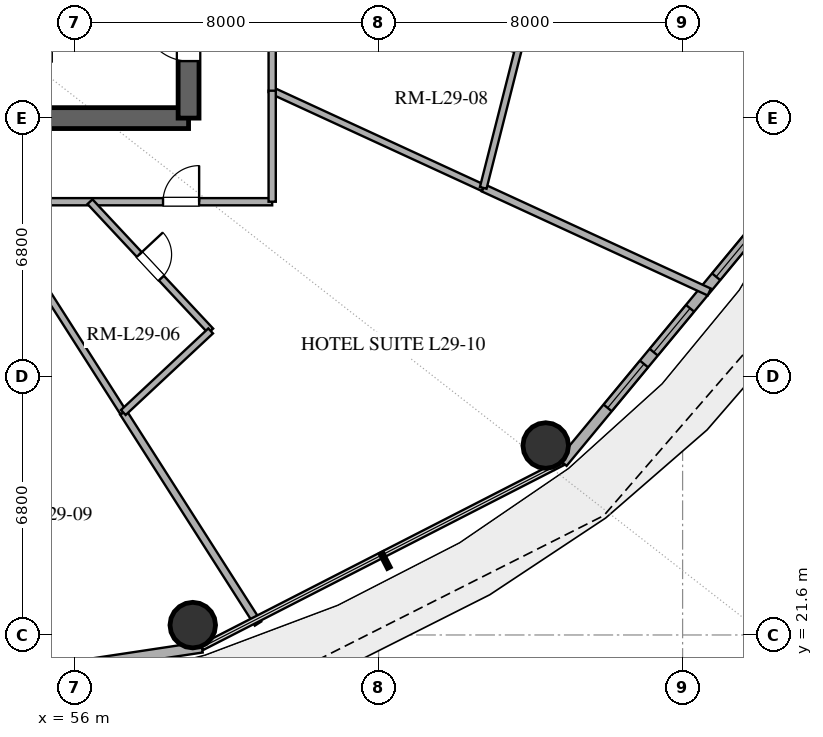
"""IFC4 building model, lengths in metres.
Left out: names, types, materials, properties, quantities, classifications, styles, units other than length and angle.
Written with IfcOpenShell. Run it as: python <this file> out.ifc"""

import sys

from ifc_helpers import new_model, si_unit, direction, frame, frame_2d, origin, origin_2d, place, context, subcontext, project, spatial, rectangle, hollow_circle, extrude, element, fill, save


model = new_model("IFC4")
c1 = context("Model", 3, precision=1e-05, world=origin(), true_north=direction((0.0, 1.0)))
c2 = subcontext(c1, "Body", "Model", "MODEL_VIEW")
j1 = project(units=[si_unit("LENGTHUNIT", "METRE"), si_unit("PLANEANGLEUNIT", "RADIAN")], contexts=[c1])
p1 = place(None, origin())
s1 = spatial("IfcSite", under=j1, at=p1, CompositionType="ELEMENT")
p2 = place(p1, origin())
s2 = spatial("IfcBuilding", under=s1, at=p2, CompositionType="ELEMENT")
p3 = place(p2, frame((0.0, 0.0, 116.4)))
s3 = spatial("IfcBuildingStorey", under=s2, at=p3, CompositionType="ELEMENT", Elevation=116.4)
p4 = place(p3, frame((55.0, 35.2, 0.0), z_axis=(0.0, 0.0, 1.0), x_axis=(1.0, 0.0, 0.0)))
e1 = element("IfcWall", 1, at=p4, inside=s3, PredefinedType="SHEAR", context=c2, shape_type="SweptSolid", body=[
    extrude(rectangle(XDim=4.0, YDim=0.55, at=frame_2d((2.0, 0.0))), origin(), (0.0, 0.0, 1.0), 3.38),
])
p5 = place(p3, frame((59.0, 35.2, 0.0), z_axis=(0.0, 0.0, 1.0), x_axis=(0.0, 1.0, 0.0)))
e2 = element("IfcWall", 2, at=p5, inside=s3, PredefinedType="SHEAR", context=c2, shape_type="SweptSolid", body=[
    extrude(rectangle(XDim=13.6, YDim=0.55, at=frame_2d((6.8, 0.0))), origin(), (0.0, 0.0, 1.0), 3.38),
])
p6 = place(p5, frame((1.5, 0.0, 0.0)))
e3 = element("IfcOpeningElement", 3, at=p6, cuts=e2, PredefinedType="OPENING", context=c2, shape_type="SweptSolid", body=[
    extrude(rectangle(XDim=1.2, YDim=2.15, at=frame_2d((0.6, 1.075))), frame((0.0, 0.285, 0.0), z_axis=(0.0, -1.0, 0.0), x_axis=(1.0, 0.0, 0.0)), (0.0, 0.0, 1.0), 0.57),
])
for number, where, z_axis, x_axis in (
    (4, (59.11, 21.859, 0.0), (0.0, 0.0, 1.0), (1.0, 0.0, 0.0)),
    (5, (68.398, 26.585, 0.0), (0.0, 0.0, 1.0), (1.0, 0.0, 0.0)),
):
    element("IfcColumn", number, at=place(p3, frame(where, z_axis=z_axis, x_axis=x_axis)), inside=s3, PredefinedType="COLUMN", context=c2, shape_type="SweptSolid", body=[
        extrude(hollow_circle(Radius=0.6, WallThickness=0.032, at=origin_2d()), origin(), (0.0, 0.0, 1.0), 3.38),
    ])
p7 = place(p3, frame((48.0, 19.57, 0.0), z_axis=(0.0, 0.0, 1.0), x_axis=(0.988877774656, 0.148730450117, 0.0)))
e6 = element("IfcWall", 6, at=p7, inside=s3, PredefinedType="SOLIDWALL", context=c2, shape_type="SweptSolid", body=[
    extrude(rectangle(XDim=11.479, YDim=0.28, at=frame_2d((5.74, 0.0))), origin(), (0.0, 0.0, 1.0), 3.38),
])
p8 = place(p7, frame((1.524, 0.0, 0.0)))
e7 = element("IfcOpeningElement", 7, at=p8, cuts=e6, PredefinedType="OPENING", context=c2, shape_type="SweptSolid", body=[
    extrude(rectangle(XDim=1.6, YDim=2.25, at=frame_2d((0.8, 1.125))), frame((0.0, 0.15, 0.0), z_axis=(0.0, -1.0, 0.0), x_axis=(1.0, 0.0, 0.0)), (0.0, 0.0, 1.0), 0.3),
])
p9 = place(p3, frame((68.84, 26.14, 0.0), z_axis=(0.0, 0.0, 1.0), x_axis=(0.637505817448, 0.770445541696, 0.0)))
e8 = element("IfcWall", 8, at=p9, inside=s3, PredefinedType="SOLIDWALL", context=c2, shape_type="SweptSolid", body=[
    extrude(rectangle(XDim=9.445, YDim=0.28, at=frame_2d((4.723, 0.0))), origin(), (0.0, 0.0, 1.0), 3.38),
])
p10 = place(p9, frame((1.863, 0.0, 0.85)))
e9 = element("IfcOpeningElement", 9, at=p10, cuts=e8, PredefinedType="OPENING", context=c2, shape_type="SweptSolid", body=[
    extrude(rectangle(XDim=1.5, YDim=1.8, at=frame_2d((0.75, 0.9))), frame((0.0, 0.15, 0.0), z_axis=(0.0, -1.0, 0.0), x_axis=(1.0, 0.0, 0.0)), (0.0, 0.0, 1.0), 0.3),
])
p11 = place(p9, frame((3.765, 0.0, 0.85)))
e10 = element("IfcOpeningElement", 10, at=p11, cuts=e8, PredefinedType="OPENING", context=c2, shape_type="SweptSolid", body=[
    extrude(rectangle(XDim=1.5, YDim=1.8, at=frame_2d((0.75, 0.9))), frame((0.0, 0.15, 0.0), z_axis=(0.0, -1.0, 0.0), x_axis=(1.0, 0.0, 0.0)), (0.0, 0.0, 1.0), 0.3),
])
p12 = place(p9, frame((6.342, 0.0, 0.85)))
e11 = element("IfcOpeningElement", 11, at=p12, cuts=e8, PredefinedType="OPENING", context=c2, shape_type="SweptSolid", body=[
    extrude(rectangle(XDim=1.35, YDim=1.8, at=frame_2d((0.675, 0.9))), frame((0.0, 0.15, 0.0), z_axis=(0.0, -1.0, 0.0), x_axis=(1.0, 0.0, 0.0)), (0.0, 0.0, 1.0), 0.3),
])
p13 = place(p3, frame((60.828, 21.9, 0.0), z_axis=(0.0, 0.0, 1.0), x_axis=(-0.537968238966, 0.842965108331, 0.0)))
e12 = element("IfcWall", 12, at=p13, inside=s3, PredefinedType="PARTITIONING", context=c2, shape_type="SweptSolid", body=[
    extrude(rectangle(XDim=6.589, YDim=0.2, at=frame_2d((3.295, 0.0))), origin(), (0.0, 0.0, 1.0), 2.74),
])
p14 = place(p3, frame((57.283, 27.454, 0.0), z_axis=(0.0, 0.0, 1.0), x_axis=(-0.537984400251, 0.842954794213, 0.0)))
e13 = element("IfcWall", 13, at=p14, inside=s3, PredefinedType="PLUMBINGWALL", context=c2, shape_type="SweptSolid", body=[
    extrude(rectangle(XDim=6.579, YDim=0.18, at=frame_2d((3.29, 0.0))), origin(), (0.0, 0.0, 1.0), 2.74),
])
p15 = place(p3, frame((72.701, 30.624, 0.0), z_axis=(0.0, 0.0, 1.0), x_axis=(-0.9083071886, 0.418303778536, 0.0)))
e14 = element("IfcWall", 14, at=p15, inside=s3, PredefinedType="PARTITIONING", context=c2, shape_type="SweptSolid", body=[
    extrude(rectangle(XDim=6.548, YDim=0.2, at=frame_2d((3.274, 0.0))), origin(), (0.0, 0.0, 1.0), 2.74),
])
p16 = place(p3, frame((66.754, 33.363, 0.0), z_axis=(0.0, 0.0, 1.0), x_axis=(-0.908301480607, 0.418316172681, 0.0)))
e15 = element("IfcWall", 15, at=p16, inside=s3, PredefinedType="PLUMBINGWALL", context=c2, shape_type="SweptSolid", body=[
    extrude(rectangle(XDim=6.115, YDim=0.18, at=frame_2d((3.057, 0.0))), origin(), (0.0, 0.0, 1.0), 2.74),
])
p17 = place(p3, frame((61.2, 46.45, 0.0), z_axis=(0.0, 0.0, 1.0), x_axis=(0.0, -1.0, 0.0)))
e16 = element("IfcWall", 16, at=p17, inside=s3, PredefinedType="PARTITIONING", context=c2, shape_type="SweptSolid", body=[
    extrude(rectangle(XDim=10.564, YDim=0.19, at=frame_2d((5.282, 0.0))), origin(), (0.0, 0.0, 1.0), 2.74),
])
p18 = place(p17, frame((4.722, 0.0, 0.0)))
e17 = element("IfcOpeningElement", 17, at=p18, cuts=e16, PredefinedType="OPENING", context=c2, shape_type="SweptSolid", body=[
    extrude(rectangle(XDim=0.95, YDim=2.15, at=frame_2d((0.475, 1.075))), frame((0.0, 0.105, 0.0), z_axis=(0.0, -1.0, 0.0), x_axis=(1.0, 0.0, 0.0)), (0.0, 0.0, 1.0), 0.21),
])
p19 = place(p3, frame((53.706, 33.0, 0.0), z_axis=(0.0, 0.0, 1.0), x_axis=(1.0, 0.0, 0.0)))
e18 = element("IfcWall", 18, at=p19, inside=s3, PredefinedType="PARTITIONING", context=c2, shape_type="SweptSolid", body=[
    extrude(rectangle(XDim=7.494, YDim=0.19, at=frame_2d((3.747, 0.0))), origin(), (0.0, 0.0, 1.0), 2.74),
])
p20 = place(p19, frame((4.622, 0.0, 0.0)))
e19 = element("IfcOpeningElement", 19, at=p20, cuts=e18, PredefinedType="OPENING", context=c2, shape_type="SweptSolid", body=[
    extrude(rectangle(XDim=0.95, YDim=2.15, at=frame_2d((0.475, 1.075))), frame((0.0, 0.105, 0.0), z_axis=(0.0, -1.0, 0.0), x_axis=(1.0, 0.0, 0.0)), (0.0, 0.0, 1.0), 0.21),
])
p21 = place(p3, frame((56.406, 33.0, 0.0), z_axis=(0.0, 0.0, 1.0), x_axis=(0.682578142961, -0.730812615348, 0.0)))
e20 = element("IfcWall", 20, at=p21, inside=s3, PredefinedType="PLUMBINGWALL", context=c2, shape_type="SweptSolid", body=[
    extrude(rectangle(XDim=4.652, YDim=0.18, at=frame_2d((2.326, 0.0))), origin(), (0.0, 0.0, 1.0), 2.74),
])
p22 = place(p21, frame((1.901, 0.0, 0.0)))
e21 = element("IfcOpeningElement", 21, at=p22, cuts=e20, PredefinedType="OPENING", context=c2, shape_type="SweptSolid", body=[
    extrude(rectangle(XDim=0.85, YDim=2.1, at=frame_2d((0.425, 1.05))), frame((0.0, 0.1, 0.0), z_axis=(0.0, -1.0, 0.0), x_axis=(1.0, 0.0, 0.0)), (0.0, 0.0, 1.0), 0.2),
])
p23 = place(p3, frame((67.678, 37.01, 0.0), z_axis=(0.0, 0.0, 1.0), x_axis=(-0.245725202551, -0.969339530212, 0.0)))
e22 = element("IfcWall", 22, at=p23, inside=s3, PredefinedType="PLUMBINGWALL", context=c2, shape_type="SweptSolid", body=[
    extrude(rectangle(XDim=3.763, YDim=0.18, at=frame_2d((1.881, 0.0))), origin(), (0.0, 0.0, 1.0), 2.74),
])
p24 = place(p3, frame((59.581, 29.601, 0.0), z_axis=(0.0, 0.0, 1.0), x_axis=(-0.730840933831, -0.682547822088, 0.0)))
e23 = element("IfcWall", 23, at=p24, inside=s3, PredefinedType="PLUMBINGWALL", context=c2, shape_type="SweptSolid", body=[
    extrude(rectangle(XDim=3.145, YDim=0.18, at=frame_2d((1.572, 0.0))), origin(), (0.0, 0.0, 1.0), 2.74),
])
p25 = place(p3, frame((61.2, 33.0, 0.0), z_axis=(0.0, 0.0, 1.0), x_axis=(0.0, 1.0, 0.0)))
e24 = element("IfcWall", 24, at=p25, inside=s3, PredefinedType="PARTITIONING", context=c2, shape_type="SweptSolid", body=[
    extrude(rectangle(XDim=2.921, YDim=0.19, at=frame_2d((1.46, 0.0))), origin(), (0.0, 0.0, 1.0), 2.74),
])
p26 = place(p10, origin())
e25 = element("IfcWindow", 25, at=p26, inside=s3, PartitioningType="SINGLE_PANEL", PredefinedType="WINDOW", context=c2, shape_type="SweptSolid", body=[
    extrude(rectangle(XDim=1.5, YDim=1.8, at=frame_2d((0.75, 0.9))), frame((0.0, 0.03, 0.0), z_axis=(0.0, -1.0, 0.0), x_axis=(1.0, 0.0, 0.0)), (0.0, 0.0, 1.0), 0.06),
])
fill(e9, e25)
p27 = place(p11, origin())
e26 = element("IfcWindow", 26, at=p27, inside=s3, PartitioningType="SINGLE_PANEL", PredefinedType="WINDOW", context=c2, shape_type="SweptSolid", body=[
    extrude(rectangle(XDim=1.5, YDim=1.8, at=frame_2d((0.75, 0.9))), frame((0.0, 0.03, 0.0), z_axis=(0.0, -1.0, 0.0), x_axis=(1.0, 0.0, 0.0)), (0.0, 0.0, 1.0), 0.06),
])
fill(e10, e26)
p28 = place(p12, origin())
e27 = element("IfcWindow", 27, at=p28, inside=s3, PartitioningType="SINGLE_PANEL", PredefinedType="WINDOW", context=c2, shape_type="SweptSolid", body=[
    extrude(rectangle(XDim=1.35, YDim=1.8, at=frame_2d((0.675, 0.9))), frame((0.0, 0.03, 0.0), z_axis=(0.0, -1.0, 0.0), x_axis=(1.0, 0.0, 0.0)), (0.0, 0.0, 1.0), 0.06),
])
fill(e11, e27)
p29 = place(p6, origin())
e28 = element("IfcDoor", 28, at=p29, inside=s3, OperationType="SINGLE_SWING_RIGHT", PredefinedType="DOOR", context=c2, shape_type="SweptSolid", body=[
    extrude(rectangle(XDim=1.2, YDim=2.15, at=frame_2d((0.6, 1.075))), frame((0.0, 0.025, 0.0), z_axis=(0.0, -1.0, 0.0), x_axis=(1.0, 0.0, 0.0)), (0.0, 0.0, 1.0), 0.05),
])
fill(e3, e28)
p30 = place(p20, origin())
e29 = element("IfcDoor", 29, at=p30, inside=s3, OperationType="SINGLE_SWING_RIGHT", PredefinedType="DOOR", context=c2, shape_type="SweptSolid", body=[
    extrude(rectangle(XDim=0.95, YDim=2.15, at=frame_2d((0.475, 1.075))), frame((0.0, 0.025, 0.0), z_axis=(0.0, -1.0, 0.0), x_axis=(1.0, 0.0, 0.0)), (0.0, 0.0, 1.0), 0.05),
])
fill(e19, e29)
p31 = place(p22, origin())
e30 = element("IfcDoor", 30, at=p31, inside=s3, OperationType="SINGLE_SWING_LEFT", PredefinedType="DOOR", context=c2, shape_type="SweptSolid", body=[
    extrude(rectangle(XDim=0.85, YDim=2.1, at=frame_2d((0.425, 1.05))), frame((0.0, 0.025, 0.0), z_axis=(0.0, -1.0, 0.0), x_axis=(1.0, 0.0, 0.0)), (0.0, 0.0, 1.0), 0.05),
])
fill(e21, e30)
save(model, sys.argv[1])
